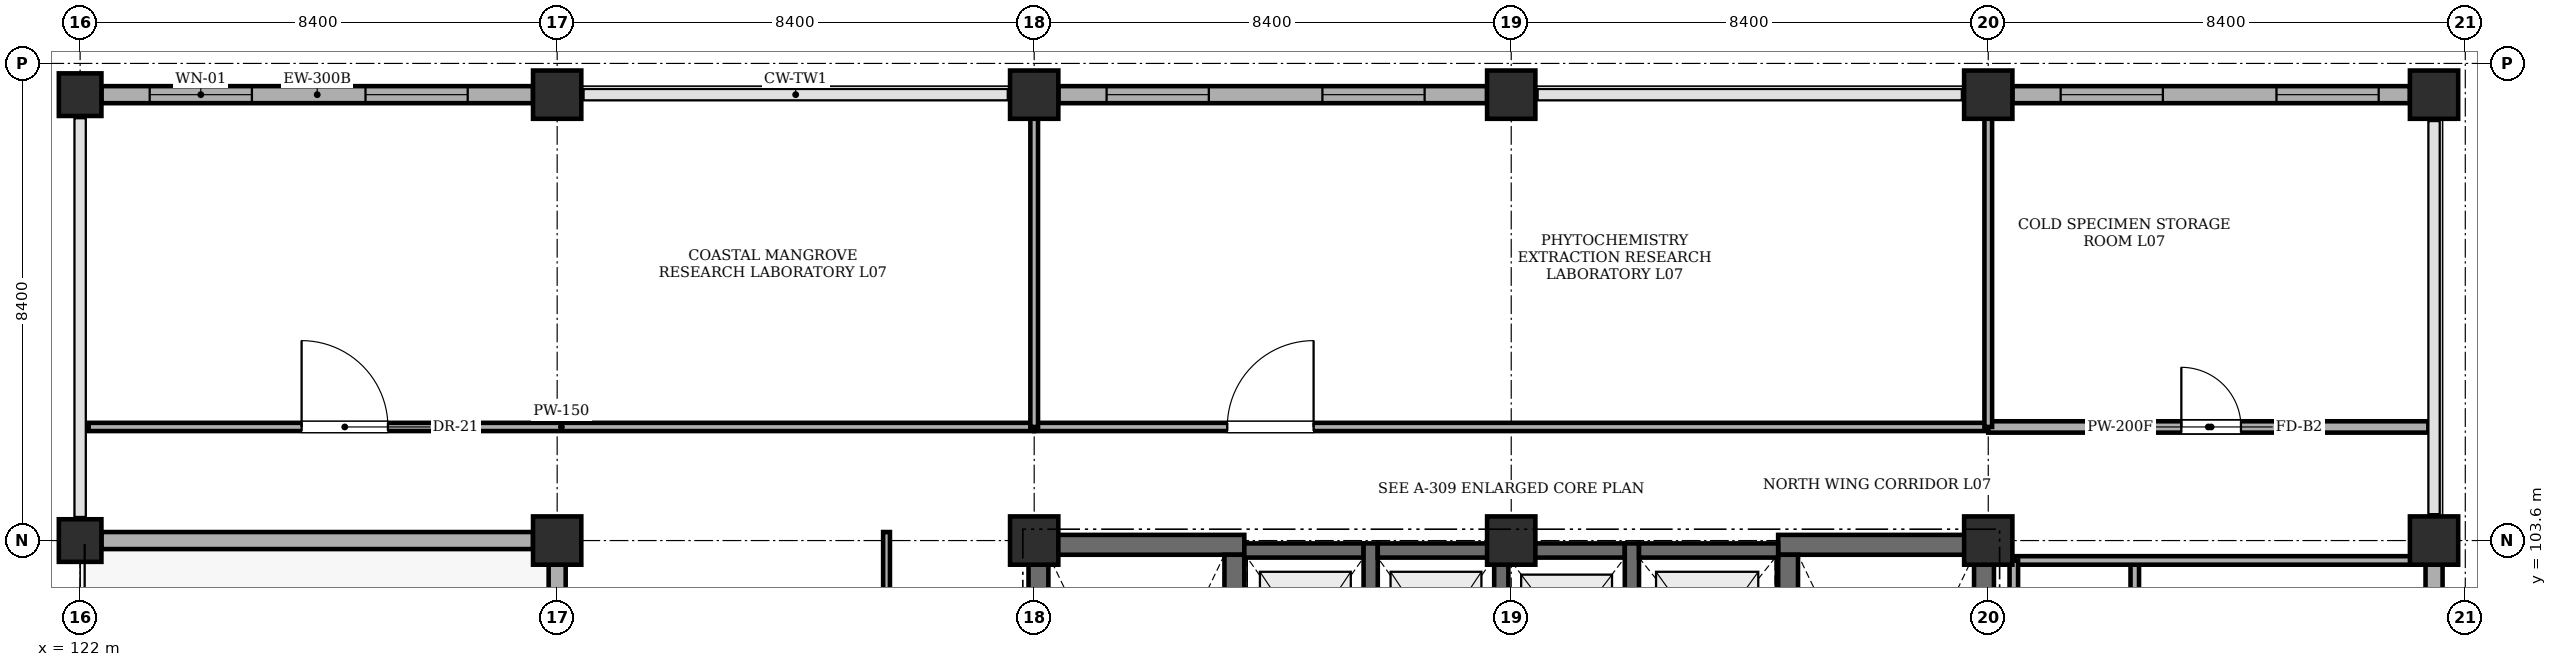
"""IFC4 building model, lengths in metres.
Left out: names, types, materials, properties, quantities, classifications, styles, units other than length and angle.
Written with IfcOpenShell. Run it as: python <this file> out.ifc"""

import sys

from ifc_helpers import new_model, si_unit, direction, frame, frame_2d, origin, origin_2d, place, context, subcontext, project, spatial, rectangle, extrude, element, fill, save


model = new_model("IFC4")
c1 = context("Model", 3, precision=1e-05, world=origin(), true_north=direction((0.0, 1.0)))
c2 = subcontext(c1, "Body", "Model", "MODEL_VIEW")
j1 = project(units=[si_unit("LENGTHUNIT", "METRE"), si_unit("PLANEANGLEUNIT", "RADIAN")], contexts=[c1])
p1 = place(None, origin())
s1 = spatial("IfcSite", under=j1, at=p1, CompositionType="ELEMENT")
p2 = place(p1, origin())
s2 = spatial("IfcBuilding", under=s1, at=p2, CompositionType="ELEMENT")
p3 = place(p2, frame((0.0, 0.0, 27.6)))
s3 = spatial("IfcBuildingStorey", under=s2, at=p3, CompositionType="ELEMENT", Elevation=27.6)
for number, where, z_axis, x_axis in (
    (1, (122.0, 103.6, 0.0), (0.0, 0.0, 1.0), (1.0, 0.0, 0.0)),
    (2, (122.0, 111.45, 0.0), (0.0, 0.0, 1.0), (1.0, 0.0, 0.0)),
):
    element("IfcColumn", number, at=place(p3, frame(where, z_axis=z_axis, x_axis=x_axis)), inside=s3, PredefinedType="COLUMN", context=c2, shape_type="SweptSolid", body=[
        extrude(rectangle(XDim=0.75, YDim=0.75, at=origin_2d()), origin(), (0.0, 0.0, 1.0), 4.02),
    ])
for number, where, z_axis, x_axis in (
    (3, (130.4, 103.6, 0.0), (0.0, 0.0, 1.0), (1.0, 0.0, 0.0)),
    (4, (130.4, 111.45, 0.0), (0.0, 0.0, 1.0), (1.0, 0.0, 0.0)),
    (5, (138.8, 103.6, 0.0), (0.0, 0.0, 1.0), (1.0, 0.0, 0.0)),
    (6, (138.8, 111.45, 0.0), (0.0, 0.0, 1.0), (1.0, 0.0, 0.0)),
    (7, (147.2, 103.6, 0.0), (0.0, 0.0, 1.0), (1.0, 0.0, 0.0)),
    (8, (147.2, 111.45, 0.0), (0.0, 0.0, 1.0), (1.0, 0.0, 0.0)),
    (9, (155.6, 103.6, 0.0), (0.0, 0.0, 1.0), (1.0, 0.0, 0.0)),
    (10, (155.6, 111.45, 0.0), (0.0, 0.0, 1.0), (1.0, 0.0, 0.0)),
    (11, (163.45, 103.6, 0.0), (0.0, 0.0, 1.0), (1.0, 0.0, 0.0)),
    (12, (163.45, 111.45, 0.0), (0.0, 0.0, 1.0), (1.0, 0.0, 0.0)),
):
    element("IfcColumn", number, at=place(p3, frame(where, z_axis=z_axis, x_axis=x_axis)), inside=s3, PredefinedType="COLUMN", context=c2, shape_type="SweptSolid", body=[
        extrude(rectangle(XDim=0.85, YDim=0.85, at=origin_2d()), origin(), (0.0, 0.0, 1.0), 4.02),
    ])
p4 = place(p3, frame((138.7, 103.525, 0.0), z_axis=(0.0, 0.0, 1.0), x_axis=(1.0, 0.0, 0.0)))
e13 = element("IfcWall", 13, at=p4, inside=s3, PredefinedType="SHEAR", context=c2, shape_type="SweptSolid", body=[
    extrude(rectangle(XDim=3.8, YDim=0.35, at=frame_2d((1.9, 0.0))), origin(), (0.0, 0.0, 1.0), 4.02),
])
p5 = place(p3, frame((138.875, 95.45, 0.0), z_axis=(0.0, 0.0, 1.0), x_axis=(0.0, 1.0, 0.0)))
e14 = element("IfcWall", 14, at=p5, inside=s3, PredefinedType="SHEAR", context=c2, shape_type="SweptSolid", body=[
    extrude(rectangle(XDim=7.9, YDim=0.35, at=frame_2d((3.95, 0.0))), origin(), (0.0, 0.0, 1.0), 4.02),
])
p6 = place(p3, frame((142.325, 95.45, 0.0), z_axis=(0.0, 0.0, 1.0), x_axis=(0.0, 1.0, 0.0)))
e15 = element("IfcWall", 15, at=p6, inside=s3, PredefinedType="SHEAR", context=c2, shape_type="SweptSolid", body=[
    extrude(rectangle(XDim=7.9, YDim=0.35, at=frame_2d((3.95, 0.0))), origin(), (0.0, 0.0, 1.0), 4.02),
])
p7 = place(p6, frame((0.22, 0.0, 0.0)))
e16 = element("IfcOpeningElement", 16, at=p7, cuts=e15, PredefinedType="OPENING", context=c2, shape_type="SweptSolid", body=[
    extrude(rectangle(XDim=1.15, YDim=2.15, at=frame_2d((0.575, 1.075))), frame((0.0, 0.185, 0.0), z_axis=(0.0, -1.0, 0.0), x_axis=(1.0, 0.0, 0.0)), (0.0, 0.0, 1.0), 0.37),
])
p8 = place(p3, frame((151.9, 103.525, 0.0), z_axis=(0.0, 0.0, 1.0), x_axis=(1.0, 0.0, 0.0)))
e17 = element("IfcWall", 17, at=p8, inside=s3, PredefinedType="SHEAR", context=c2, shape_type="SweptSolid", body=[
    extrude(rectangle(XDim=3.8, YDim=0.35, at=frame_2d((1.9, 0.0))), origin(), (0.0, 0.0, 1.0), 4.02),
])
p9 = place(p3, frame((152.075, 95.45, 0.0), z_axis=(0.0, 0.0, 1.0), x_axis=(0.0, 1.0, 0.0)))
e18 = element("IfcWall", 18, at=p9, inside=s3, PredefinedType="SHEAR", context=c2, shape_type="SweptSolid", body=[
    extrude(rectangle(XDim=7.9, YDim=0.35, at=frame_2d((3.95, 0.0))), origin(), (0.0, 0.0, 1.0), 4.02),
])
p10 = place(p9, frame((0.35, 0.0, 0.0)))
e19 = element("IfcOpeningElement", 19, at=p10, cuts=e18, PredefinedType="OPENING", context=c2, shape_type="SweptSolid", body=[
    extrude(rectangle(XDim=1.15, YDim=2.15, at=frame_2d((0.575, 1.075))), frame((0.0, 0.185, 0.0), z_axis=(0.0, -1.0, 0.0), x_axis=(1.0, 0.0, 0.0)), (0.0, 0.0, 1.0), 0.37),
])
p11 = place(p3, frame((155.525, 95.45, 0.0), z_axis=(0.0, 0.0, 1.0), x_axis=(0.0, 1.0, 0.0)))
e20 = element("IfcWall", 20, at=p11, inside=s3, PredefinedType="SHEAR", context=c2, shape_type="SweptSolid", body=[
    extrude(rectangle(XDim=7.9, YDim=0.35, at=frame_2d((3.95, 0.0))), origin(), (0.0, 0.0, 1.0), 4.02),
])
p12 = place(p3, frame((142.5, 103.425, 0.0), z_axis=(0.0, 0.0, 1.0), x_axis=(1.0, 0.0, 0.0)))
e21 = element("IfcWall", 21, at=p12, inside=s3, PredefinedType="SHEAR", context=c2, shape_type="SweptSolid", body=[
    extrude(rectangle(XDim=2.1, YDim=0.25, at=frame_2d((1.05, 0.0))), origin(), (0.0, 0.0, 1.0), 4.02),
])
p13 = place(p3, frame((144.725, 100.15, 0.0), z_axis=(0.0, 0.0, 1.0), x_axis=(0.0, 1.0, 0.0)))
e22 = element("IfcWall", 22, at=p13, inside=s3, PredefinedType="SHEAR", context=c2, shape_type="SweptSolid", body=[
    extrude(rectangle(XDim=3.4, YDim=0.25, at=frame_2d((1.7, 0.0))), origin(), (0.0, 0.0, 1.0), 4.02),
])
p14 = place(p3, frame((144.85, 103.425, 0.0), z_axis=(0.0, 0.0, 1.0), x_axis=(1.0, 0.0, 0.0)))
e23 = element("IfcWall", 23, at=p14, inside=s3, PredefinedType="SHEAR", context=c2, shape_type="SweptSolid", body=[
    extrude(rectangle(XDim=2.05, YDim=0.25, at=frame_2d((1.025, 0.0))), origin(), (0.0, 0.0, 1.0), 4.02),
])
p15 = place(p3, frame((147.025, 100.15, 0.0), z_axis=(0.0, 0.0, 1.0), x_axis=(0.0, 1.0, 0.0)))
e24 = element("IfcWall", 24, at=p15, inside=s3, PredefinedType="SHEAR", context=c2, shape_type="SweptSolid", body=[
    extrude(rectangle(XDim=3.4, YDim=0.25, at=frame_2d((1.7, 0.0))), origin(), (0.0, 0.0, 1.0), 4.02),
])
p16 = place(p3, frame((147.15, 103.425, 0.0), z_axis=(0.0, 0.0, 1.0), x_axis=(1.0, 0.0, 0.0)))
e25 = element("IfcWall", 25, at=p16, inside=s3, PredefinedType="SHEAR", context=c2, shape_type="SweptSolid", body=[
    extrude(rectangle(XDim=2.05, YDim=0.25, at=frame_2d((1.025, 0.0))), origin(), (0.0, 0.0, 1.0), 4.02),
])
p17 = place(p3, frame((149.325, 100.35, 0.0), z_axis=(0.0, 0.0, 1.0), x_axis=(0.0, 1.0, 0.0)))
e26 = element("IfcWall", 26, at=p17, inside=s3, PredefinedType="SHEAR", context=c2, shape_type="SweptSolid", body=[
    extrude(rectangle(XDim=3.2, YDim=0.25, at=frame_2d((1.6, 0.0))), origin(), (0.0, 0.0, 1.0), 4.02),
])
p18 = place(p3, frame((149.45, 103.425, 0.0), z_axis=(0.0, 0.0, 1.0), x_axis=(1.0, 0.0, 0.0)))
e27 = element("IfcWall", 27, at=p18, inside=s3, PredefinedType="SHEAR", context=c2, shape_type="SweptSolid", body=[
    extrude(rectangle(XDim=2.45, YDim=0.25, at=frame_2d((1.225, 0.0))), origin(), (0.0, 0.0, 1.0), 4.02),
])
p19 = place(p3, frame((122.375, 111.45, 0.0), z_axis=(0.0, 0.0, 1.0), x_axis=(1.0, 0.0, 0.0)))
e28 = element("IfcWall", 28, at=p19, inside=s3, PredefinedType="STANDARD", context=c2, shape_type="SweptSolid", body=[
    extrude(rectangle(XDim=7.6, YDim=0.3, at=frame_2d((3.8, 0.0))), origin(), (0.0, 0.0, 1.0), 3.32),
])
p20 = place(p19, frame((0.85, 0.0, 0.9)))
e29 = element("IfcOpeningElement", 29, at=p20, cuts=e28, PredefinedType="OPENING", context=c2, shape_type="SweptSolid", body=[
    extrude(rectangle(XDim=1.8, YDim=2.1, at=frame_2d((0.9, 1.05))), frame((0.0, 0.16, 0.0), z_axis=(0.0, -1.0, 0.0), x_axis=(1.0, 0.0, 0.0)), (0.0, 0.0, 1.0), 0.32),
])
p21 = place(p19, frame((4.65, 0.0, 0.9)))
e30 = element("IfcOpeningElement", 30, at=p21, cuts=e28, PredefinedType="OPENING", context=c2, shape_type="SweptSolid", body=[
    extrude(rectangle(XDim=1.8, YDim=2.1, at=frame_2d((0.9, 1.05))), frame((0.0, 0.16, 0.0), z_axis=(0.0, -1.0, 0.0), x_axis=(1.0, 0.0, 0.0)), (0.0, 0.0, 1.0), 0.32),
])
p22 = place(p3, frame((139.225, 111.45, 0.0), z_axis=(0.0, 0.0, 1.0), x_axis=(1.0, 0.0, 0.0)))
e31 = element("IfcWall", 31, at=p22, inside=s3, PredefinedType="STANDARD", context=c2, shape_type="SweptSolid", body=[
    extrude(rectangle(XDim=7.55, YDim=0.3, at=frame_2d((3.775, 0.0))), origin(), (0.0, 0.0, 1.0), 3.32),
])
p23 = place(p22, frame((0.85, 0.0, 0.9)))
e32 = element("IfcOpeningElement", 32, at=p23, cuts=e31, PredefinedType="OPENING", context=c2, shape_type="SweptSolid", body=[
    extrude(rectangle(XDim=1.8, YDim=2.1, at=frame_2d((0.9, 1.05))), frame((0.0, 0.16, 0.0), z_axis=(0.0, -1.0, 0.0), x_axis=(1.0, 0.0, 0.0)), (0.0, 0.0, 1.0), 0.32),
])
p24 = place(p22, frame((4.65, 0.0, 0.9)))
e33 = element("IfcOpeningElement", 33, at=p24, cuts=e31, PredefinedType="OPENING", context=c2, shape_type="SweptSolid", body=[
    extrude(rectangle(XDim=1.8, YDim=2.1, at=frame_2d((0.9, 1.05))), frame((0.0, 0.16, 0.0), z_axis=(0.0, -1.0, 0.0), x_axis=(1.0, 0.0, 0.0)), (0.0, 0.0, 1.0), 0.32),
])
p25 = place(p3, frame((156.025, 111.45, 0.0), z_axis=(0.0, 0.0, 1.0), x_axis=(1.0, 0.0, 0.0)))
e34 = element("IfcWall", 34, at=p25, inside=s3, PredefinedType="STANDARD", context=c2, shape_type="SweptSolid", body=[
    extrude(rectangle(XDim=7.0, YDim=0.3, at=frame_2d((3.5, 0.0))), origin(), (0.0, 0.0, 1.0), 3.32),
])
p26 = place(p25, frame((0.85, 0.0, 0.9)))
e35 = element("IfcOpeningElement", 35, at=p26, cuts=e34, PredefinedType="OPENING", context=c2, shape_type="SweptSolid", body=[
    extrude(rectangle(XDim=1.8, YDim=2.1, at=frame_2d((0.9, 1.05))), frame((0.0, 0.16, 0.0), z_axis=(0.0, -1.0, 0.0), x_axis=(1.0, 0.0, 0.0)), (0.0, 0.0, 1.0), 0.32),
])
p27 = place(p25, frame((4.65, 0.0, 0.9)))
e36 = element("IfcOpeningElement", 36, at=p27, cuts=e34, PredefinedType="OPENING", context=c2, shape_type="SweptSolid", body=[
    extrude(rectangle(XDim=1.8, YDim=2.1, at=frame_2d((0.9, 1.05))), frame((0.0, 0.16, 0.0), z_axis=(0.0, -1.0, 0.0), x_axis=(1.0, 0.0, 0.0)), (0.0, 0.0, 1.0), 0.32),
])
p28 = place(p3, frame((163.45, 103.175, 0.0), z_axis=(0.0, 0.0, 1.0), x_axis=(0.0, -1.0, 0.0)))
e37 = element("IfcWall", 37, at=p28, inside=s3, PredefinedType="STANDARD", context=c2, shape_type="SweptSolid", body=[
    extrude(rectangle(XDim=7.55, YDim=0.3, at=frame_2d((3.775, 0.0))), origin(), (0.0, 0.0, 1.0), 3.32),
])
p29 = place(p28, frame((1.15, 0.0, 1.1)))
e38 = element("IfcOpeningElement", 38, at=p29, cuts=e37, PredefinedType="OPENING", context=c2, shape_type="SweptSolid", body=[
    extrude(rectangle(XDim=1.4, YDim=1.4, at=frame_2d((0.7, 0.7))), frame((0.0, 0.16, 0.0), z_axis=(0.0, -1.0, 0.0), x_axis=(1.0, 0.0, 0.0)), (0.0, 0.0, 1.0), 0.32),
])
p30 = place(p3, frame((130.4, 95.625, 0.0), z_axis=(0.0, 0.0, 1.0), x_axis=(0.0, 1.0, 0.0)))
e39 = element("IfcWall", 39, at=p30, inside=s3, PredefinedType="STANDARD", context=c2, shape_type="SweptSolid", body=[
    extrude(rectangle(XDim=7.55, YDim=0.3, at=frame_2d((3.775, 0.0))), origin(), (0.0, 0.0, 1.0), 3.32),
])
p31 = place(p30, frame((2.4, 0.0, 1.0)))
e40 = element("IfcOpeningElement", 40, at=p31, cuts=e39, PredefinedType="OPENING", context=c2, shape_type="SweptSolid", body=[
    extrude(rectangle(XDim=1.8, YDim=1.8, at=frame_2d((0.9, 0.9))), frame((0.0, 0.16, 0.0), z_axis=(0.0, -1.0, 0.0), x_axis=(1.0, 0.0, 0.0)), (0.0, 0.0, 1.0), 0.32),
])
p32 = place(p3, frame((129.975, 103.6, 0.0), z_axis=(0.0, 0.0, 1.0), x_axis=(-1.0, 0.0, 0.0)))
e41 = element("IfcWall", 41, at=p32, inside=s3, PredefinedType="STANDARD", context=c2, shape_type="SweptSolid", body=[
    extrude(rectangle(XDim=7.6, YDim=0.3, at=frame_2d((3.8, 0.0))), origin(), (0.0, 0.0, 1.0), 3.32),
])
p33 = place(p3, frame((158.18, 94.68, 0.0), z_axis=(0.0, 0.0, 1.0), x_axis=(0.0, 1.0, 0.0)))
e42 = element("IfcWall", 42, at=p33, inside=s3, PredefinedType="PARTITIONING", context=c2, shape_type="SweptSolid", body=[
    extrude(rectangle(XDim=8.57, YDim=0.15, at=frame_2d((4.285, 0.0))), origin(), (0.0, 0.0, 1.0), 4.02),
])
p34 = place(p33, frame((0.8, 0.0, 0.0)))
e43 = element("IfcOpeningElement", 43, at=p34, cuts=e42, PredefinedType="OPENING", context=c2, shape_type="SweptSolid", body=[
    extrude(rectangle(XDim=1.0, YDim=2.12, at=frame_2d((0.5, 1.06))), frame((0.0, 0.085, 0.0), z_axis=(0.0, -1.0, 0.0), x_axis=(1.0, 0.0, 0.0)), (0.0, 0.0, 1.0), 0.17),
])
p35 = place(p33, frame((3.5, 0.0, 0.0)))
e44 = element("IfcOpeningElement", 44, at=p35, cuts=e42, PredefinedType="OPENING", context=c2, shape_type="SweptSolid", body=[
    extrude(rectangle(XDim=0.92, YDim=2.1, at=frame_2d((0.46, 1.05))), frame((0.0, 0.085, 0.0), z_axis=(0.0, -1.0, 0.0), x_axis=(1.0, 0.0, 0.0)), (0.0, 0.0, 1.0), 0.17),
])
p36 = place(p33, frame((6.4, 0.0, 0.0)))
e45 = element("IfcOpeningElement", 45, at=p36, cuts=e42, PredefinedType="OPENING", context=c2, shape_type="SweptSolid", body=[
    extrude(rectangle(XDim=0.92, YDim=2.1, at=frame_2d((0.46, 1.05))), frame((0.0, 0.085, 0.0), z_axis=(0.0, -1.0, 0.0), x_axis=(1.0, 0.0, 0.0)), (0.0, 0.0, 1.0), 0.17),
])
p37 = place(p3, frame((156.05, 103.25, 0.0), z_axis=(0.0, 0.0, 1.0), x_axis=(1.0, 0.0, 0.0)))
e46 = element("IfcWall", 46, at=p37, inside=s3, PredefinedType="PARTITIONING", context=c2, shape_type="SweptSolid", body=[
    extrude(rectangle(XDim=7.15, YDim=0.15, at=frame_2d((3.575, 0.0))), origin(), (0.0, 0.0, 1.0), 4.02),
])
p38 = place(p3, frame((156.05, 94.68, 0.0), z_axis=(0.0, 0.0, 1.0), x_axis=(0.0, 1.0, 0.0)))
e47 = element("IfcWall", 47, at=p38, inside=s3, PredefinedType="PARTITIONING", context=c2, shape_type="SweptSolid", body=[
    extrude(rectangle(XDim=8.57, YDim=0.15, at=frame_2d((4.285, 0.0))), origin(), (0.0, 0.0, 1.0), 4.02),
])
p39 = place(p3, frame((136.2, 94.68, 0.0), z_axis=(0.0, 0.0, 1.0), x_axis=(0.0, 1.0, 0.0)))
e48 = element("IfcWall", 48, at=p39, inside=s3, PredefinedType="PARTITIONING", context=c2, shape_type="SweptSolid", body=[
    extrude(rectangle(XDim=9.07, YDim=0.12, at=frame_2d((4.535, 0.0))), origin(), (0.0, 0.0, 1.0), 4.02),
])
p40 = place(p3, frame((122.15, 105.6, 0.0), z_axis=(0.0, 0.0, 1.0), x_axis=(1.0, 0.0, 0.0)))
e49 = element("IfcWall", 49, at=p40, inside=s3, PredefinedType="PARTITIONING", context=c2, shape_type="SweptSolid", body=[
    extrude(rectangle(XDim=16.65, YDim=0.145, at=frame_2d((8.325, 0.0))), origin(), (0.0, 0.0, 1.0), 4.02),
])
p41 = place(p40, frame((3.75, 0.0, 0.0)))
e50 = element("IfcOpeningElement", 50, at=p41, cuts=e49, PredefinedType="OPENING", context=c2, shape_type="SweptSolid", body=[
    extrude(rectangle(XDim=1.52, YDim=2.22, at=frame_2d((0.76, 1.11))), frame((0.0, 0.083, 0.0), z_axis=(0.0, -1.0, 0.0), x_axis=(1.0, 0.0, 0.0)), (0.0, 0.0, 1.0), 0.165),
])
p42 = place(p3, frame((138.8, 105.6, 0.0), z_axis=(0.0, 0.0, 1.0), x_axis=(1.0, 0.0, 0.0)))
e51 = element("IfcWall", 51, at=p42, inside=s3, PredefinedType="PARTITIONING", context=c2, shape_type="SweptSolid", body=[
    extrude(rectangle(XDim=16.8, YDim=0.145, at=frame_2d((8.4, 0.0))), origin(), (0.0, 0.0, 1.0), 4.02),
])
p43 = place(p42, frame((3.4, 0.0, 0.0)))
e52 = element("IfcOpeningElement", 52, at=p43, cuts=e51, PredefinedType="OPENING", context=c2, shape_type="SweptSolid", body=[
    extrude(rectangle(XDim=1.52, YDim=2.22, at=frame_2d((0.76, 1.11))), frame((0.0, 0.083, 0.0), z_axis=(0.0, -1.0, 0.0), x_axis=(1.0, 0.0, 0.0)), (0.0, 0.0, 1.0), 0.165),
])
p44 = place(p3, frame((138.8, 105.6, 0.0), z_axis=(0.0, 0.0, 1.0), x_axis=(0.0, 1.0, 0.0)))
e53 = element("IfcWall", 53, at=p44, inside=s3, PredefinedType="PARTITIONING", context=c2, shape_type="SweptSolid", body=[
    extrude(rectangle(XDim=5.75, YDim=0.135, at=frame_2d((2.875, 0.0))), origin(), (0.0, 0.0, 1.0), 3.32),
])
p45 = place(p3, frame((155.6, 105.6, 0.0), z_axis=(0.0, 0.0, 1.0), x_axis=(1.0, 0.0, 0.0)))
e54 = element("IfcWall", 54, at=p45, inside=s3, PredefinedType="SOLIDWALL", context=c2, shape_type="SweptSolid", body=[
    extrude(rectangle(XDim=7.75, YDim=0.2, at=frame_2d((3.875, 0.0))), origin(), (0.0, 0.0, 1.0), 4.02),
])
p46 = place(p45, frame((3.4, 0.0, 0.0)))
e55 = element("IfcOpeningElement", 55, at=p46, cuts=e54, PredefinedType="OPENING", context=c2, shape_type="SweptSolid", body=[
    extrude(rectangle(XDim=1.05, YDim=2.15, at=frame_2d((0.525, 1.075))), frame((0.0, 0.11, 0.0), z_axis=(0.0, -1.0, 0.0), x_axis=(1.0, 0.0, 0.0)), (0.0, 0.0, 1.0), 0.22),
])
p47 = place(p3, frame((155.6, 105.6, 0.0), z_axis=(0.0, 0.0, 1.0), x_axis=(0.0, 1.0, 0.0)))
e56 = element("IfcWall", 56, at=p47, inside=s3, PredefinedType="PARTITIONING", context=c2, shape_type="SweptSolid", body=[
    extrude(rectangle(XDim=5.75, YDim=0.135, at=frame_2d((2.875, 0.0))), origin(), (0.0, 0.0, 1.0), 3.32),
])
p48 = place(p20, origin())
e57 = element("IfcWindow", 57, at=p48, inside=s3, PartitioningType="DOUBLE_PANEL_VERTICAL", PredefinedType="WINDOW", context=c2, shape_type="SweptSolid", body=[
    extrude(rectangle(XDim=1.8, YDim=2.1, at=frame_2d((0.9, 1.05))), frame((0.0, 0.03, 0.0), z_axis=(0.0, -1.0, 0.0), x_axis=(1.0, 0.0, 0.0)), (0.0, 0.0, 1.0), 0.06),
])
fill(e29, e57)
p49 = place(p21, origin())
e58 = element("IfcWindow", 58, at=p49, inside=s3, PartitioningType="DOUBLE_PANEL_VERTICAL", PredefinedType="WINDOW", context=c2, shape_type="SweptSolid", body=[
    extrude(rectangle(XDim=1.8, YDim=2.1, at=frame_2d((0.9, 1.05))), frame((0.0, 0.03, 0.0), z_axis=(0.0, -1.0, 0.0), x_axis=(1.0, 0.0, 0.0)), (0.0, 0.0, 1.0), 0.06),
])
fill(e30, e58)
p50 = place(p23, origin())
e59 = element("IfcWindow", 59, at=p50, inside=s3, PartitioningType="DOUBLE_PANEL_VERTICAL", PredefinedType="WINDOW", context=c2, shape_type="SweptSolid", body=[
    extrude(rectangle(XDim=1.8, YDim=2.1, at=frame_2d((0.9, 1.05))), frame((0.0, 0.03, 0.0), z_axis=(0.0, -1.0, 0.0), x_axis=(1.0, 0.0, 0.0)), (0.0, 0.0, 1.0), 0.06),
])
fill(e32, e59)
p51 = place(p24, origin())
e60 = element("IfcWindow", 60, at=p51, inside=s3, PartitioningType="DOUBLE_PANEL_VERTICAL", PredefinedType="WINDOW", context=c2, shape_type="SweptSolid", body=[
    extrude(rectangle(XDim=1.8, YDim=2.1, at=frame_2d((0.9, 1.05))), frame((0.0, 0.03, 0.0), z_axis=(0.0, -1.0, 0.0), x_axis=(1.0, 0.0, 0.0)), (0.0, 0.0, 1.0), 0.06),
])
fill(e33, e60)
p52 = place(p26, origin())
e61 = element("IfcWindow", 61, at=p52, inside=s3, PartitioningType="DOUBLE_PANEL_VERTICAL", PredefinedType="WINDOW", context=c2, shape_type="SweptSolid", body=[
    extrude(rectangle(XDim=1.8, YDim=2.1, at=frame_2d((0.9, 1.05))), frame((0.0, 0.03, 0.0), z_axis=(0.0, -1.0, 0.0), x_axis=(1.0, 0.0, 0.0)), (0.0, 0.0, 1.0), 0.06),
])
fill(e35, e61)
p53 = place(p27, origin())
e62 = element("IfcWindow", 62, at=p53, inside=s3, PartitioningType="DOUBLE_PANEL_VERTICAL", PredefinedType="WINDOW", context=c2, shape_type="SweptSolid", body=[
    extrude(rectangle(XDim=1.8, YDim=2.1, at=frame_2d((0.9, 1.05))), frame((0.0, 0.03, 0.0), z_axis=(0.0, -1.0, 0.0), x_axis=(1.0, 0.0, 0.0)), (0.0, 0.0, 1.0), 0.06),
])
fill(e36, e62)
p54 = place(p41, origin())
e63 = element("IfcDoor", 63, at=p54, inside=s3, OperationType="SINGLE_SWING_LEFT", PredefinedType="DOOR", context=c2, shape_type="SweptSolid", body=[
    extrude(rectangle(XDim=1.52, YDim=2.22, at=frame_2d((0.76, 1.11))), frame((0.0, 0.025, 0.0), z_axis=(0.0, -1.0, 0.0), x_axis=(1.0, 0.0, 0.0)), (0.0, 0.0, 1.0), 0.05),
])
fill(e50, e63)
p55 = place(p43, origin())
e64 = element("IfcDoor", 64, at=p55, inside=s3, OperationType="SINGLE_SWING_RIGHT", PredefinedType="DOOR", context=c2, shape_type="SweptSolid", body=[
    extrude(rectangle(XDim=1.52, YDim=2.22, at=frame_2d((0.76, 1.11))), frame((0.0, 0.025, 0.0), z_axis=(0.0, -1.0, 0.0), x_axis=(1.0, 0.0, 0.0)), (0.0, 0.0, 1.0), 0.05),
])
fill(e52, e64)
p56 = place(p46, origin())
e65 = element("IfcDoor", 65, at=p56, inside=s3, OperationType="SINGLE_SWING_LEFT", PredefinedType="DOOR", context=c2, shape_type="SweptSolid", body=[
    extrude(rectangle(XDim=1.05, YDim=2.15, at=frame_2d((0.525, 1.075))), frame((0.0, 0.025, 0.0), z_axis=(0.0, -1.0, 0.0), x_axis=(1.0, 0.0, 0.0)), (0.0, 0.0, 1.0), 0.05),
])
fill(e55, e65)
save(model, sys.argv[1])
